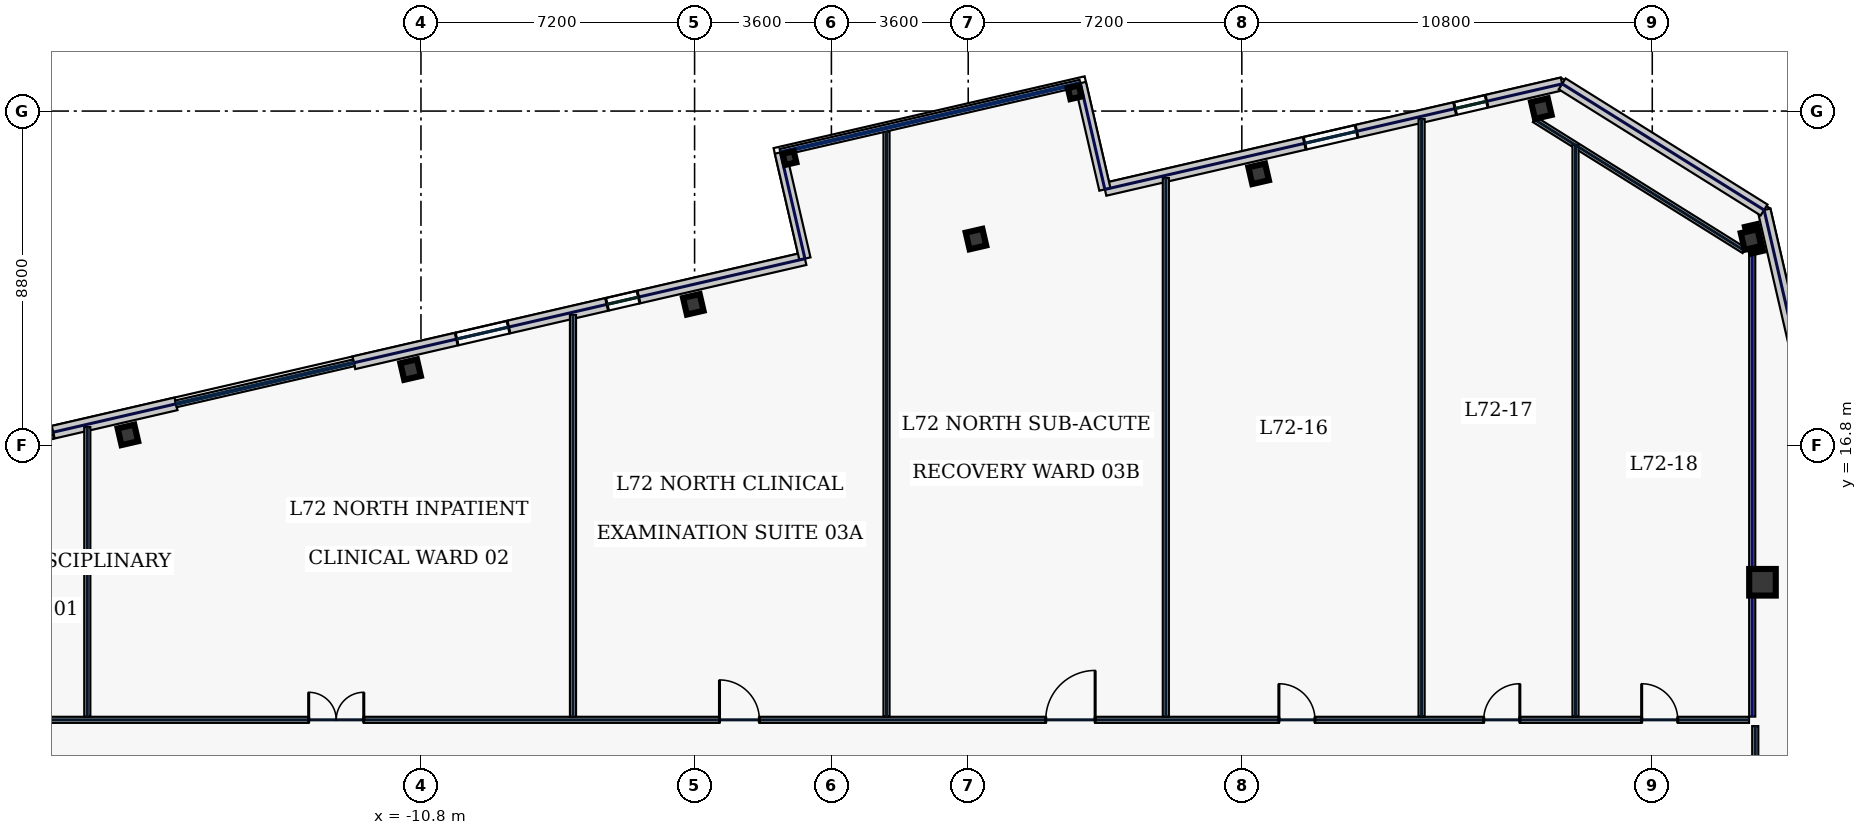
"""IFC4 building model, lengths in metres.
Left out: names, types, materials, properties, quantities, classifications, styles, units other than length and angle.
Written with IfcOpenShell. Run it as: python <this file> out.ifc"""

import sys

from ifc_helpers import new_model, si_unit, direction, frame, frame_2d, origin, origin_2d, place, context, subcontext, project, spatial, rectangle, hollow_rectangle, extrude, element, fill, save


model = new_model("IFC4")
c1 = context("Model", 3, precision=1e-05, world=origin(), true_north=direction((0.0, 1.0)))
c2 = subcontext(c1, "Body", "Model", "MODEL_VIEW")
j1 = project(units=[si_unit("LENGTHUNIT", "METRE"), si_unit("PLANEANGLEUNIT", "RADIAN")], contexts=[c1])
p1 = place(None, origin())
s1 = spatial("IfcSite", under=j1, at=p1, CompositionType="ELEMENT")
p2 = place(p1, origin())
s2 = spatial("IfcBuilding", under=s1, at=p2, CompositionType="ELEMENT")
p3 = place(p2, frame((0.0, 0.0, 309.0)))
s3 = spatial("IfcBuildingStorey", under=s2, at=p3, CompositionType="ELEMENT", Elevation=309.0)
p4 = place(p3, frame((24.5, 13.2, 0.0), z_axis=(0.0, 0.0, 1.0), x_axis=(1.0, 0.0, 0.0)))
e1 = element("IfcColumn", 1, at=p4, inside=s3, PredefinedType="COLUMN", context=c2, shape_type="SweptSolid", body=[
    extrude(hollow_rectangle(XDim=0.7, YDim=0.7, WallThickness=0.032, at=origin_2d()), origin(), (0.0, 0.0, 1.0), 3.74),
])
for number, where, z_axis, x_axis in (
    (2, (18.682, 25.666, 0.0), (0.0, 0.0, 1.0), (0.974, 0.225, 0.0)),
    (3, (11.243, 23.949, 0.0), (0.0, 0.0, 1.0), (0.974, 0.225, 0.0)),
    (4, (3.804, 22.232, 0.0), (0.0, 0.0, 1.0), (0.974, 0.225, 0.0)),
    (5, (-3.634, 20.514, 0.0), (0.0, 0.0, 1.0), (0.974, 0.225, 0.0)),
    (6, (-11.073, 18.797, 0.0), (0.0, 0.0, 1.0), (0.974, 0.225, 0.0)),
    (7, (-18.511, 17.08, 0.0), (0.0, 0.0, 1.0), (0.974, 0.225, 0.0)),
    (8, (24.198, 22.219, 0.0), (0.0, 0.0, 1.0), (0.974, 0.225, 0.0)),
):
    element("IfcColumn", number, at=place(p3, frame(where, z_axis=z_axis, x_axis=x_axis)), inside=s3, PredefinedType="COLUMN", context=c2, shape_type="SweptSolid", body=[
        extrude(hollow_rectangle(XDim=0.45, YDim=0.45, WallThickness=0.022, at=origin_2d()), origin(), (0.0, 0.0, 1.0), 3.74),
    ])
for number, where, z_axis, x_axis in (
    (9, (-1.102, 24.363, 0.0), (0.0, 0.0, 1.0), (0.974, 0.225, 0.0)),
    (10, (6.401, 26.095, 0.0), (0.0, 0.0, 1.0), (0.974, 0.225, 0.0)),
):
    element("IfcColumn", number, at=place(p3, frame(where, z_axis=z_axis, x_axis=x_axis)), inside=s3, PredefinedType="COLUMN", context=c2, shape_type="SweptSolid", body=[
        extrude(hollow_rectangle(XDim=0.3, YDim=0.3, WallThickness=0.016, at=origin_2d()), origin(), (0.0, 0.0, 1.0), 3.74),
    ])
p5 = place(p3, frame((19.229, 26.316, 0.0), z_axis=(0.0, 0.0, 1.0), x_axis=(-0.974371201193, -0.224946131964, 0.0)))
e11 = element("IfcWall", 11, at=p5, inside=s3, PredefinedType="STANDARD", context=c2, shape_type="SweptSolid", body=[
    extrude(rectangle(XDim=12.35, YDim=0.34, at=frame_2d((6.175, 0.0))), origin(), (0.0, 0.0, 1.0), 3.74),
])
p6 = place(p5, frame((5.553, 0.0, 1.0)))
e12 = element("IfcOpeningElement", 12, at=p6, cuts=e11, PredefinedType="OPENING", context=c2, shape_type="SweptSolid", body=[
    extrude(rectangle(XDim=1.4, YDim=1.85, at=frame_2d((0.7, 0.925))), frame((0.0, 0.18, 0.0), z_axis=(0.0, -1.0, 0.0), x_axis=(1.0, 0.0, 0.0)), (0.0, 0.0, 1.0), 0.36),
])
p7 = place(p5, frame((2.041, 0.0, 1.0)))
e13 = element("IfcOpeningElement", 13, at=p7, cuts=e11, PredefinedType="OPENING", context=c2, shape_type="SweptSolid", body=[
    extrude(rectangle(XDim=0.85, YDim=1.85, at=frame_2d((0.425, 0.925))), frame((0.0, 0.18, 0.0), z_axis=(0.0, -1.0, 0.0), x_axis=(1.0, 0.0, 0.0)), (0.0, 0.0, 1.0), 0.36),
])
p8 = place(p3, frame((-0.696, 21.716, 0.0), z_axis=(0.0, 0.0, 1.0), x_axis=(-0.974367550465, -0.224961944785, 0.0)))
e14 = element("IfcWall", 14, at=p8, inside=s3, PredefinedType="STANDARD", context=c2, shape_type="SweptSolid", body=[
    extrude(rectangle(XDim=12.184, YDim=0.34, at=frame_2d((6.092, 0.0))), origin(), (0.0, 0.0, 1.0), 3.74),
])
p9 = place(p8, frame((8.006, 0.0, 1.0)))
e15 = element("IfcOpeningElement", 15, at=p9, cuts=e14, PredefinedType="OPENING", context=c2, shape_type="SweptSolid", body=[
    extrude(rectangle(XDim=1.4, YDim=1.85, at=frame_2d((0.7, 0.925))), frame((0.0, 0.18, 0.0), z_axis=(0.0, -1.0, 0.0), x_axis=(1.0, 0.0, 0.0)), (0.0, 0.0, 1.0), 0.36),
])
p10 = place(p8, frame((4.494, 0.0, 1.0)))
e16 = element("IfcOpeningElement", 16, at=p10, cuts=e14, PredefinedType="OPENING", context=c2, shape_type="SweptSolid", body=[
    extrude(rectangle(XDim=0.85, YDim=1.85, at=frame_2d((0.425, 0.925))), frame((0.0, 0.18, 0.0), z_axis=(0.0, -1.0, 0.0), x_axis=(1.0, 0.0, 0.0)), (0.0, 0.0, 1.0), 0.36),
])
p11 = place(p3, frame((-17.245, 17.895, 0.0), z_axis=(0.0, 0.0, 1.0), x_axis=(-0.97437318493, -0.224937539085, 0.0)))
e17 = element("IfcWall", 17, at=p11, inside=s3, PredefinedType="STANDARD", context=c2, shape_type="SweptSolid", body=[
    extrude(rectangle(XDim=17.366, YDim=0.34, at=frame_2d((8.683, 0.0))), origin(), (0.0, 0.0, 1.0), 3.74),
])
p12 = place(p11, frame((13.925, 0.0, 1.0)))
e18 = element("IfcOpeningElement", 18, at=p12, cuts=e17, PredefinedType="OPENING", context=c2, shape_type="SweptSolid", body=[
    extrude(rectangle(XDim=1.4, YDim=1.85, at=frame_2d((0.7, 0.925))), frame((0.0, 0.18, 0.0), z_axis=(0.0, -1.0, 0.0), x_axis=(1.0, 0.0, 0.0)), (0.0, 0.0, 1.0), 0.36),
])
p13 = place(p11, frame((10.413, 0.0, 1.0)))
e19 = element("IfcOpeningElement", 19, at=p13, cuts=e17, PredefinedType="OPENING", context=c2, shape_type="SweptSolid", body=[
    extrude(rectangle(XDim=1.4, YDim=1.85, at=frame_2d((0.7, 0.925))), frame((0.0, 0.18, 0.0), z_axis=(0.0, -1.0, 0.0), x_axis=(1.0, 0.0, 0.0)), (0.0, 0.0, 1.0), 0.36),
])
p14 = place(p11, frame((3.329, 0.0, 1.0)))
e20 = element("IfcOpeningElement", 20, at=p14, cuts=e17, PredefinedType="OPENING", context=c2, shape_type="SweptSolid", body=[
    extrude(rectangle(XDim=0.85, YDim=1.85, at=frame_2d((0.425, 0.925))), frame((0.0, 0.18, 0.0), z_axis=(0.0, -1.0, 0.0), x_axis=(1.0, 0.0, 0.0)), (0.0, 0.0, 1.0), 0.36),
])
p15 = place(p3, frame((32.686, -12.276, 0.0), z_axis=(0.0, 0.0, 1.0), x_axis=(-0.224953091034, 0.974369594576, 0.0)))
e21 = element("IfcWall", 21, at=p15, inside=s3, PredefinedType="STANDARD", context=c2, shape_type="SweptSolid", body=[
    extrude(rectangle(XDim=36.2, YDim=0.34, at=frame_2d((18.1, 0.0))), origin(), (0.0, 0.0, 1.0), 3.74),
])
p16 = place(p15, frame((3.725, 0.0, 0.58)))
e22 = element("IfcOpeningElement", 22, at=p16, cuts=e21, PredefinedType="OPENING", context=c2, shape_type="SweptSolid", body=[
    extrude(rectangle(XDim=1.6, YDim=2.3, at=frame_2d((0.8, 1.15))), frame((0.0, 0.18, 0.0), z_axis=(0.0, -1.0, 0.0), x_axis=(1.0, 0.0, 0.0)), (0.0, 0.0, 1.0), 0.36),
])
p17 = place(p15, frame((12.425, 0.0, 0.75)))
e23 = element("IfcOpeningElement", 23, at=p17, cuts=e21, PredefinedType="OPENING", context=c2, shape_type="SweptSolid", body=[
    extrude(rectangle(XDim=0.85, YDim=1.85, at=frame_2d((0.425, 0.925))), frame((0.0, 0.18, 0.0), z_axis=(0.0, -1.0, 0.0), x_axis=(1.0, 0.0, 0.0)), (0.0, 0.0, 1.0), 0.36),
])
p18 = place(p15, frame((21.825, 0.0, 0.58)))
e24 = element("IfcOpeningElement", 24, at=p18, cuts=e21, PredefinedType="OPENING", context=c2, shape_type="SweptSolid", body=[
    extrude(rectangle(XDim=1.6, YDim=2.3, at=frame_2d((0.8, 1.15))), frame((0.0, 0.18, 0.0), z_axis=(0.0, -1.0, 0.0), x_axis=(1.0, 0.0, 0.0)), (0.0, 0.0, 1.0), 0.36),
])
p19 = place(p15, frame((30.875, 0.0, 0.58)))
e25 = element("IfcOpeningElement", 25, at=p19, cuts=e21, PredefinedType="OPENING", context=c2, shape_type="SweptSolid", body=[
    extrude(rectangle(XDim=1.6, YDim=2.3, at=frame_2d((0.8, 1.15))), frame((0.0, 0.18, 0.0), z_axis=(0.0, -1.0, 0.0), x_axis=(1.0, 0.0, 0.0)), (0.0, 0.0, 1.0), 0.36),
])
p20 = place(p3, frame((24.542, 22.996, 0.0), z_axis=(0.0, 0.0, 1.0), x_axis=(-0.848055220921, 0.529907862057, 0.0)))
e26 = element("IfcWall", 26, at=p20, inside=s3, PredefinedType="STANDARD", context=c2, shape_type="SweptSolid", body=[
    extrude(rectangle(XDim=6.265, YDim=0.34, at=frame_2d((3.132, 0.0))), origin(), (0.0, 0.0, 1.0), 3.74),
])
for number, where, z_axis, x_axis in (
    (27, (-0.696, 21.716, 0.0), (0.0, 0.0, 1.0), (-0.225, 0.974, 0.0)),
    (28, (7.196, 23.538, 0.0), (0.0, 0.0, 1.0), (-0.225, 0.974, 0.0)),
):
    element("IfcWall", number, at=place(p3, frame(where, z_axis=z_axis, x_axis=x_axis)), inside=s3, PredefinedType="STANDARD", context=c2, shape_type="SweptSolid", body=[
        extrude(rectangle(XDim=2.87, YDim=0.3, at=frame_2d((1.435, 0.0))), origin(), (0.0, 0.0, 1.0), 3.74),
    ])
p21 = place(p3, frame((24.018, 21.931, 0.0), z_axis=(0.0, 0.0, 1.0), x_axis=(-0.848051009591, 0.529914601736, 0.0)))
e29 = element("IfcWall", 29, at=p21, inside=s3, PredefinedType="PARTITIONING", context=c2, shape_type="SweptSolid", body=[
    extrude(rectangle(XDim=6.505, YDim=0.16, at=frame_2d((3.253, 0.0))), origin(), (0.0, 0.0, 1.0), 3.74),
])
p22 = place(p3, frame((-24.145, 9.58, 0.0), z_axis=(0.0, 0.0, 1.0), x_axis=(1.0, 0.0, 0.0)))
e30 = element("IfcWall", 30, at=p22, inside=s3, PredefinedType="PARTITIONING", context=c2, shape_type="SweptSolid", body=[
    extrude(rectangle(XDim=48.29, YDim=0.16, at=frame_2d((24.145, 0.0))), origin(), (0.0, 0.0, 1.0), 3.74),
])
p23 = place(p22, frame((2.044, 0.0, 0.0)))
e31 = element("IfcOpeningElement", 31, at=p23, cuts=e30, PredefinedType="OPENING", context=c2, shape_type="SweptSolid", body=[
    extrude(rectangle(XDim=0.95, YDim=2.2, at=frame_2d((0.475, 1.1))), frame((0.0, 0.09, 0.0), z_axis=(0.0, -1.0, 0.0), x_axis=(1.0, 0.0, 0.0)), (0.0, 0.0, 1.0), 0.18),
])
p24 = place(p22, frame((10.39, 0.0, 0.0)))
e32 = element("IfcOpeningElement", 32, at=p24, cuts=e30, PredefinedType="OPENING", context=c2, shape_type="SweptSolid", body=[
    extrude(rectangle(XDim=1.45, YDim=2.2, at=frame_2d((0.725, 1.1))), frame((0.0, 0.09, 0.0), z_axis=(0.0, -1.0, 0.0), x_axis=(1.0, 0.0, 0.0)), (0.0, 0.0, 1.0), 0.18),
])
p25 = place(p22, frame((21.2, 0.0, 0.0)))
e33 = element("IfcOpeningElement", 33, at=p25, cuts=e30, PredefinedType="OPENING", context=c2, shape_type="SweptSolid", body=[
    extrude(rectangle(XDim=1.05, YDim=2.2, at=frame_2d((0.525, 1.1))), frame((0.0, 0.09, 0.0), z_axis=(0.0, -1.0, 0.0), x_axis=(1.0, 0.0, 0.0)), (0.0, 0.0, 1.0), 0.18),
])
p26 = place(p22, frame((29.785, 0.0, 0.0)))
e34 = element("IfcOpeningElement", 34, at=p26, cuts=e30, PredefinedType="OPENING", context=c2, shape_type="SweptSolid", body=[
    extrude(rectangle(XDim=1.3, YDim=2.2, at=frame_2d((0.65, 1.1))), frame((0.0, 0.09, 0.0), z_axis=(0.0, -1.0, 0.0), x_axis=(1.0, 0.0, 0.0)), (0.0, 0.0, 1.0), 0.18),
])
p27 = place(p22, frame((35.92, 0.0, 0.0)))
e35 = element("IfcOpeningElement", 35, at=p27, cuts=e30, PredefinedType="OPENING", context=c2, shape_type="SweptSolid", body=[
    extrude(rectangle(XDim=0.95, YDim=2.2, at=frame_2d((0.475, 1.1))), frame((0.0, 0.09, 0.0), z_axis=(0.0, -1.0, 0.0), x_axis=(1.0, 0.0, 0.0)), (0.0, 0.0, 1.0), 0.18),
])
p28 = place(p22, frame((41.31, 0.0, 0.0)))
e36 = element("IfcOpeningElement", 36, at=p28, cuts=e30, PredefinedType="OPENING", context=c2, shape_type="SweptSolid", body=[
    extrude(rectangle(XDim=0.95, YDim=2.2, at=frame_2d((0.475, 1.1))), frame((0.0, 0.09, 0.0), z_axis=(0.0, -1.0, 0.0), x_axis=(1.0, 0.0, 0.0)), (0.0, 0.0, 1.0), 0.18),
])
p29 = place(p22, frame((45.466, 0.0, 0.0)))
e37 = element("IfcOpeningElement", 37, at=p29, cuts=e30, PredefinedType="OPENING", context=c2, shape_type="SweptSolid", body=[
    extrude(rectangle(XDim=0.95, YDim=2.2, at=frame_2d((0.475, 1.1))), frame((0.0, 0.09, 0.0), z_axis=(0.0, -1.0, 0.0), x_axis=(1.0, 0.0, 0.0)), (0.0, 0.0, 1.0), 0.18),
])
p30 = place(p3, frame((24.31, 9.415, 0.0), z_axis=(0.0, 0.0, 1.0), x_axis=(0.0, -1.0, 0.0)))
e38 = element("IfcWall", 38, at=p30, inside=s3, PredefinedType="PARTITIONING", context=c2, shape_type="SweptSolid", body=[
    extrude(rectangle(XDim=18.63, YDim=0.16, at=frame_2d((9.315, 0.0))), origin(), (0.0, 0.0, 1.0), 3.74),
])
p31 = place(p30, frame((12.856, 0.0, 0.0)))
e39 = element("IfcOpeningElement", 39, at=p31, cuts=e38, PredefinedType="OPENING", context=c2, shape_type="SweptSolid", body=[
    extrude(rectangle(XDim=0.95, YDim=2.2, at=frame_2d((0.475, 1.1))), frame((0.0, 0.09, 0.0), z_axis=(0.0, -1.0, 0.0), x_axis=(1.0, 0.0, 0.0)), (0.0, 0.0, 1.0), 0.18),
])
p32 = place(p30, frame((3.844, 0.0, 0.0)))
e40 = element("IfcOpeningElement", 40, at=p32, cuts=e38, PredefinedType="OPENING", context=c2, shape_type="SweptSolid", body=[
    extrude(rectangle(XDim=0.95, YDim=2.2, at=frame_2d((0.475, 1.1))), frame((0.0, 0.09, 0.0), z_axis=(0.0, -1.0, 0.0), x_axis=(1.0, 0.0, 0.0)), (0.0, 0.0, 1.0), 0.18),
])
p33 = place(p3, frame((24.23, 9.665, 0.0), z_axis=(0.0, 0.0, 1.0), x_axis=(0.0, 1.0, 0.0)))
e41 = element("IfcWall", 41, at=p33, inside=s3, PredefinedType="PARTITIONING", context=c2, shape_type="SweptSolid", body=[
    extrude(rectangle(XDim=12.906, YDim=0.16, at=frame_2d((6.453, 0.0))), origin(), (0.0, 0.0, 1.0), 3.185),
])
p34 = place(p3, frame((-19.58, 9.665, 0.0), z_axis=(0.0, 0.0, 1.0), x_axis=(0.0, 1.0, 0.0)))
e42 = element("IfcWall", 42, at=p34, inside=s3, PredefinedType="PARTITIONING", context=c2, shape_type="SweptSolid", body=[
    extrude(rectangle(XDim=7.619, YDim=0.16, at=frame_2d((3.81, 0.0))), origin(), (0.0, 0.0, 1.0), 3.74),
])
p35 = place(p3, frame((-6.8, 9.665, 0.0), z_axis=(0.0, 0.0, 1.0), x_axis=(0.0, 1.0, 0.0)))
e43 = element("IfcWall", 43, at=p35, inside=s3, PredefinedType="PARTITIONING", context=c2, shape_type="SweptSolid", body=[
    extrude(rectangle(XDim=10.57, YDim=0.16, at=frame_2d((5.285, 0.0))), origin(), (0.0, 0.0, 1.0), 3.74),
])
p36 = place(p3, frame((8.8, 9.665, 0.0), z_axis=(0.0, 0.0, 1.0), x_axis=(0.0, 1.0, 0.0)))
e44 = element("IfcWall", 44, at=p36, inside=s3, PredefinedType="PARTITIONING", context=c2, shape_type="SweptSolid", body=[
    extrude(rectangle(XDim=14.171, YDim=0.16, at=frame_2d((7.086, 0.0))), origin(), (0.0, 0.0, 1.0), 3.74),
])
p37 = place(p3, frame((19.58, 9.665, 0.0), z_axis=(0.0, 0.0, 1.0), x_axis=(0.0, 1.0, 0.0)))
e45 = element("IfcWall", 45, at=p37, inside=s3, PredefinedType="PARTITIONING", context=c2, shape_type="SweptSolid", body=[
    extrude(rectangle(XDim=15.048, YDim=0.16, at=frame_2d((7.524, 0.0))), origin(), (0.0, 0.0, 1.0), 3.74),
])
p38 = place(p3, frame((1.45, 9.665, 0.0), z_axis=(0.0, 0.0, 1.0), x_axis=(0.0, 1.0, 0.0)))
e46 = element("IfcWall", 46, at=p38, inside=s3, PredefinedType="PARTITIONING", context=c2, shape_type="SweptSolid", body=[
    extrude(rectangle(XDim=15.4, YDim=0.16, at=frame_2d((7.7, 0.0))), origin(), (0.0, 0.0, 1.0), 3.74),
])
p39 = place(p3, frame((15.53, 9.665, 0.0), z_axis=(0.0, 0.0, 1.0), x_axis=(0.0, 1.0, 0.0)))
e47 = element("IfcWall", 47, at=p39, inside=s3, PredefinedType="PARTITIONING", context=c2, shape_type="SweptSolid", body=[
    extrude(rectangle(XDim=15.725, YDim=0.16, at=frame_2d((7.863, 0.0))), origin(), (0.0, 0.0, 1.0), 3.74),
])
p40 = place(p6, origin())
e48 = element("IfcWindow", 48, at=p40, inside=s3, PartitioningType="SINGLE_PANEL", PredefinedType="WINDOW", context=c2, shape_type="SweptSolid", body=[
    extrude(rectangle(XDim=1.4, YDim=1.85, at=frame_2d((0.7, 0.925))), frame((0.0, 0.03, 0.0), z_axis=(0.0, -1.0, 0.0), x_axis=(1.0, 0.0, 0.0)), (0.0, 0.0, 1.0), 0.06),
])
fill(e12, e48)
p41 = place(p7, origin())
e49 = element("IfcWindow", 49, at=p41, inside=s3, PartitioningType="SINGLE_PANEL", PredefinedType="WINDOW", context=c2, shape_type="SweptSolid", body=[
    extrude(rectangle(XDim=0.85, YDim=1.85, at=frame_2d((0.425, 0.925))), frame((0.0, 0.03, 0.0), z_axis=(0.0, -1.0, 0.0), x_axis=(1.0, 0.0, 0.0)), (0.0, 0.0, 1.0), 0.06),
])
fill(e13, e49)
p42 = place(p9, origin())
e50 = element("IfcWindow", 50, at=p42, inside=s3, PartitioningType="SINGLE_PANEL", PredefinedType="WINDOW", context=c2, shape_type="SweptSolid", body=[
    extrude(rectangle(XDim=1.4, YDim=1.85, at=frame_2d((0.7, 0.925))), frame((0.0, 0.03, 0.0), z_axis=(0.0, -1.0, 0.0), x_axis=(1.0, 0.0, 0.0)), (0.0, 0.0, 1.0), 0.06),
])
fill(e15, e50)
p43 = place(p10, origin())
e51 = element("IfcWindow", 51, at=p43, inside=s3, PartitioningType="SINGLE_PANEL", PredefinedType="WINDOW", context=c2, shape_type="SweptSolid", body=[
    extrude(rectangle(XDim=0.85, YDim=1.85, at=frame_2d((0.425, 0.925))), frame((0.0, 0.03, 0.0), z_axis=(0.0, -1.0, 0.0), x_axis=(1.0, 0.0, 0.0)), (0.0, 0.0, 1.0), 0.06),
])
fill(e16, e51)
p44 = place(p14, origin())
e52 = element("IfcWindow", 52, at=p44, inside=s3, PartitioningType="SINGLE_PANEL", PredefinedType="WINDOW", context=c2, shape_type="SweptSolid", body=[
    extrude(rectangle(XDim=0.85, YDim=1.85, at=frame_2d((0.425, 0.925))), frame((0.0, 0.03, 0.0), z_axis=(0.0, -1.0, 0.0), x_axis=(1.0, 0.0, 0.0)), (0.0, 0.0, 1.0), 0.06),
])
fill(e20, e52)
p45 = place(p24, origin())
e53 = element("IfcDoor", 53, at=p45, inside=s3, OperationType="DOUBLE_SWING_LEFT", PredefinedType="DOOR", context=c2, shape_type="SweptSolid", body=[
    extrude(rectangle(XDim=1.45, YDim=2.2, at=frame_2d((0.725, 1.1))), frame((0.0, 0.025, 0.0), z_axis=(0.0, -1.0, 0.0), x_axis=(1.0, 0.0, 0.0)), (0.0, 0.0, 1.0), 0.05),
])
fill(e32, e53)
p46 = place(p25, origin())
e54 = element("IfcDoor", 54, at=p46, inside=s3, OperationType="SINGLE_SWING_LEFT", PredefinedType="DOOR", context=c2, shape_type="SweptSolid", body=[
    extrude(rectangle(XDim=1.05, YDim=2.2, at=frame_2d((0.525, 1.1))), frame((0.0, 0.025, 0.0), z_axis=(0.0, -1.0, 0.0), x_axis=(1.0, 0.0, 0.0)), (0.0, 0.0, 1.0), 0.05),
])
fill(e33, e54)
p47 = place(p26, origin())
e55 = element("IfcDoor", 55, at=p47, inside=s3, OperationType="SINGLE_SWING_RIGHT", PredefinedType="DOOR", context=c2, shape_type="SweptSolid", body=[
    extrude(rectangle(XDim=1.3, YDim=2.2, at=frame_2d((0.65, 1.1))), frame((0.0, 0.025, 0.0), z_axis=(0.0, -1.0, 0.0), x_axis=(1.0, 0.0, 0.0)), (0.0, 0.0, 1.0), 0.05),
])
fill(e34, e55)
p48 = place(p27, origin())
e56 = element("IfcDoor", 56, at=p48, inside=s3, OperationType="SINGLE_SWING_LEFT", PredefinedType="DOOR", context=c2, shape_type="SweptSolid", body=[
    extrude(rectangle(XDim=0.95, YDim=2.2, at=frame_2d((0.475, 1.1))), frame((0.0, 0.025, 0.0), z_axis=(0.0, -1.0, 0.0), x_axis=(1.0, 0.0, 0.0)), (0.0, 0.0, 1.0), 0.05),
])
fill(e35, e56)
p49 = place(p28, origin())
e57 = element("IfcDoor", 57, at=p49, inside=s3, OperationType="SINGLE_SWING_RIGHT", PredefinedType="DOOR", context=c2, shape_type="SweptSolid", body=[
    extrude(rectangle(XDim=0.95, YDim=2.2, at=frame_2d((0.475, 1.1))), frame((0.0, 0.025, 0.0), z_axis=(0.0, -1.0, 0.0), x_axis=(1.0, 0.0, 0.0)), (0.0, 0.0, 1.0), 0.05),
])
fill(e36, e57)
p50 = place(p29, origin())
e58 = element("IfcDoor", 58, at=p50, inside=s3, OperationType="SINGLE_SWING_LEFT", PredefinedType="DOOR", context=c2, shape_type="SweptSolid", body=[
    extrude(rectangle(XDim=0.95, YDim=2.2, at=frame_2d((0.475, 1.1))), frame((0.0, 0.025, 0.0), z_axis=(0.0, -1.0, 0.0), x_axis=(1.0, 0.0, 0.0)), (0.0, 0.0, 1.0), 0.05),
])
fill(e37, e58)
save(model, sys.argv[1])
